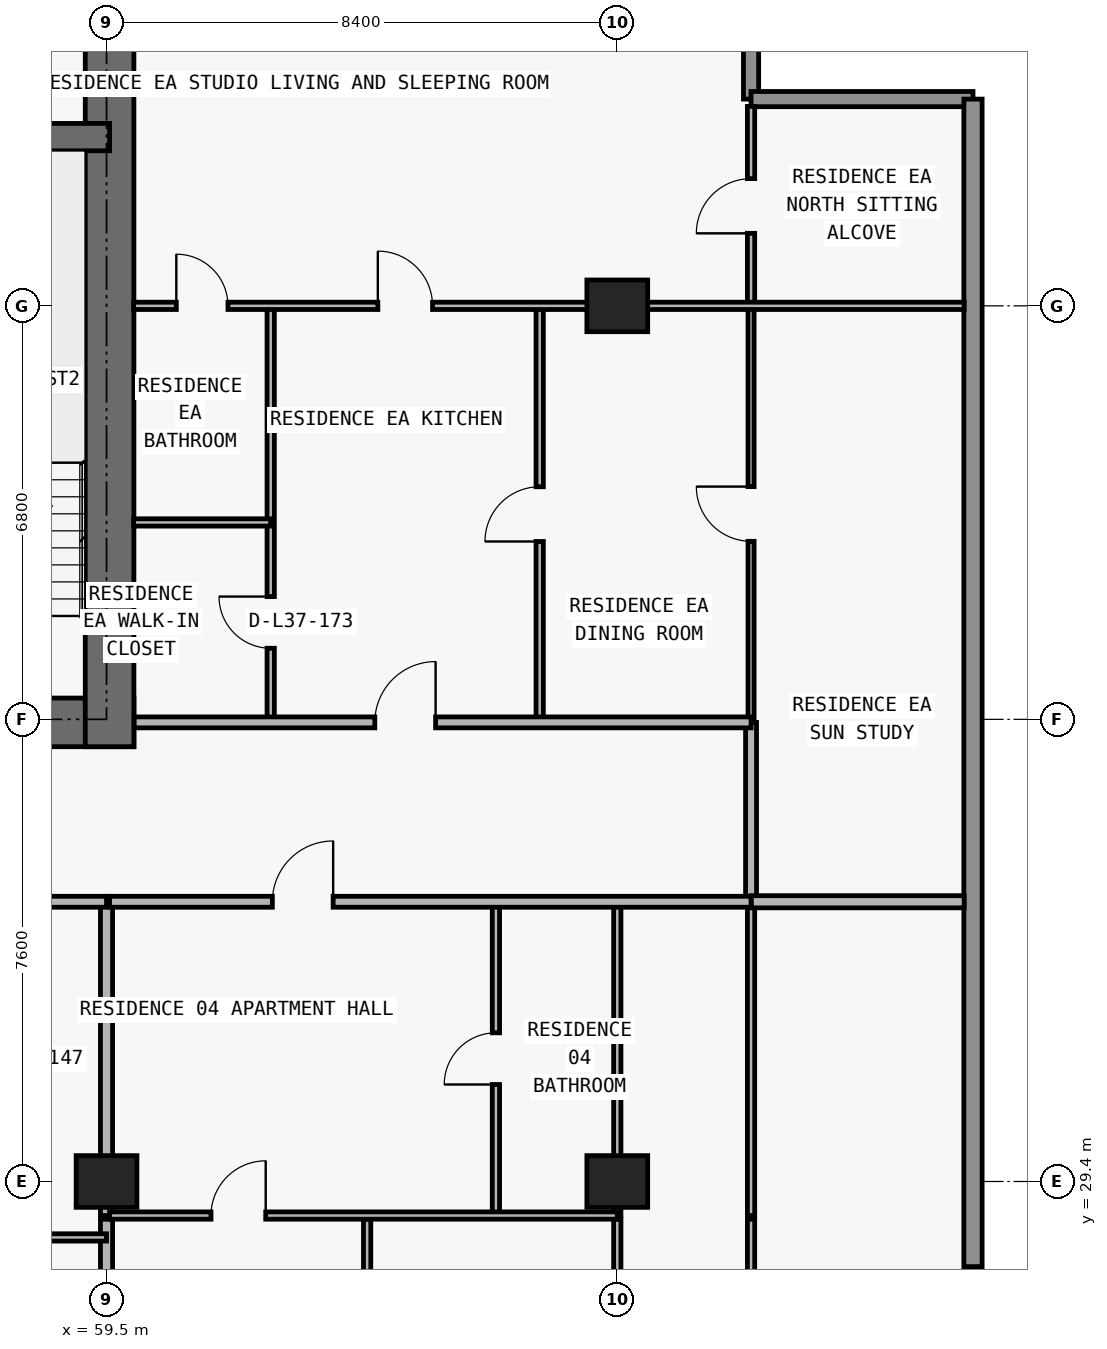
"""IFC4 building model, lengths in metres.
Left out: names, types, materials, properties, quantities, classifications, styles, units other than length and angle.
Written with IfcOpenShell. Run it as: python <this file> out.ifc"""

import sys

from ifc_helpers import new_model, si_unit, direction, frame, frame_2d, origin, origin_2d, place, context, subcontext, project, spatial, rectangle, extrude, element, fill, save


model = new_model("IFC4")
c1 = context("Model", 3, precision=1e-05, world=origin(), true_north=direction((0.0, 1.0)))
c2 = subcontext(c1, "Body", "Model", "MODEL_VIEW")
j1 = project(units=[si_unit("LENGTHUNIT", "METRE"), si_unit("PLANEANGLEUNIT", "RADIAN")], contexts=[c1])
p1 = place(None, origin())
s1 = spatial("IfcSite", under=j1, at=p1, CompositionType="ELEMENT")
p2 = place(p1, origin())
s2 = spatial("IfcBuilding", under=s1, at=p2, CompositionType="ELEMENT")
p3 = place(p2, frame((0.0, 0.0, 135.6)))
s3 = spatial("IfcBuildingStorey", under=s2, at=p3, CompositionType="ELEMENT", Elevation=135.6)
for number, where, z_axis, x_axis in (
    (1, (59.5, 29.4, 0.0), (0.0, 0.0, 1.0), (1.0, 0.0, 0.0)),
    (2, (67.9, 29.4, 0.0), (0.0, 0.0, 1.0), (1.0, 0.0, 0.0)),
    (3, (67.9, 43.8, 0.0), (0.0, 0.0, 1.0), (1.0, 0.0, 0.0)),
):
    element("IfcColumn", number, at=place(p3, frame(where, z_axis=z_axis, x_axis=x_axis)), inside=s3, PredefinedType="COLUMN", context=c2, shape_type="SweptSolid", body=[
        extrude(rectangle(XDim=1.0, YDim=0.85, at=origin_2d()), origin(), (0.0, 0.0, 1.0), 3.05),
    ])
p4 = place(p3, frame((17.85, 36.95, 0.0), z_axis=(0.0, 0.0, 1.0), x_axis=(1.0, 0.0, 0.0)))
e4 = element("IfcWall", 4, at=p4, inside=s3, PredefinedType="SHEAR", context=c2, shape_type="SweptSolid", body=[
    extrude(rectangle(XDim=42.1, YDim=0.8, at=frame_2d((21.05, 0.0))), origin(), (0.0, 0.0, 1.0), 3.05),
])
p5 = place(p4, frame((14.45, 0.0, 0.0)))
e5 = element("IfcOpeningElement", 5, at=p5, cuts=e4, PredefinedType="OPENING", context=c2, shape_type="SweptSolid", body=[
    extrude(rectangle(XDim=1.1, YDim=2.15, at=frame_2d((0.55, 1.075))), frame((0.0, 0.41, 0.0), z_axis=(0.0, -1.0, 0.0), x_axis=(1.0, 0.0, 0.0)), (0.0, 0.0, 1.0), 0.82),
])
p6 = place(p4, frame((6.3, 0.0, 0.0)))
e6 = element("IfcOpeningElement", 6, at=p6, cuts=e4, PredefinedType="OPENING", context=c2, shape_type="SweptSolid", body=[
    extrude(rectangle(XDim=1.05, YDim=2.15, at=frame_2d((0.525, 1.075))), frame((0.0, 0.41, 0.0), z_axis=(0.0, -1.0, 0.0), x_axis=(1.0, 0.0, 0.0)), (0.0, 0.0, 1.0), 0.82),
])
p7 = place(p4, frame((34.8, 0.0, 0.0)))
e7 = element("IfcOpeningElement", 7, at=p7, cuts=e4, PredefinedType="OPENING", context=c2, shape_type="SweptSolid", body=[
    extrude(rectangle(XDim=1.05, YDim=2.15, at=frame_2d((0.525, 1.075))), frame((0.0, 0.41, 0.0), z_axis=(0.0, -1.0, 0.0), x_axis=(1.0, 0.0, 0.0)), (0.0, 0.0, 1.0), 0.82),
])
p8 = place(p4, frame((10.913, 0.0, 0.0)))
e8 = element("IfcOpeningElement", 8, at=p8, cuts=e4, PredefinedType="OPENING", context=c2, shape_type="SweptSolid", body=[
    extrude(rectangle(XDim=1.05, YDim=2.15, at=frame_2d((0.525, 1.075))), frame((0.0, 0.41, 0.0), z_axis=(0.0, -1.0, 0.0), x_axis=(1.0, 0.0, 0.0)), (0.0, 0.0, 1.0), 0.82),
])
p9 = place(p4, frame((24.15, 0.0, 0.0)))
e9 = element("IfcOpeningElement", 9, at=p9, cuts=e4, PredefinedType="OPENING", context=c2, shape_type="SweptSolid", body=[
    extrude(rectangle(XDim=1.05, YDim=2.15, at=frame_2d((0.525, 1.075))), frame((0.0, 0.41, 0.0), z_axis=(0.0, -1.0, 0.0), x_axis=(1.0, 0.0, 0.0)), (0.0, 0.0, 1.0), 0.82),
])
p10 = place(p3, frame((59.55, 36.55, 0.0), z_axis=(0.0, 0.0, 1.0), x_axis=(0.0, 1.0, 0.0)))
e10 = element("IfcWall", 10, at=p10, inside=s3, PredefinedType="SHEAR", context=c2, shape_type="SweptSolid", body=[
    extrude(rectangle(XDim=14.05, YDim=0.8, at=frame_2d((7.025, 0.0))), origin(), (0.0, 0.0, 1.0), 3.05),
])
p11 = place(p3, frame((18.25, 46.575, 0.0), z_axis=(0.0, 0.0, 1.0), x_axis=(1.0, 0.0, 0.0)))
e11 = element("IfcWall", 11, at=p11, inside=s3, PredefinedType="SHEAR", context=c2, shape_type="SweptSolid", body=[
    extrude(rectangle(XDim=41.3, YDim=0.45, at=frame_2d((20.65, 0.0))), origin(), (0.0, 0.0, 1.0), 3.05),
])
p12 = place(p11, frame((7.625, 0.0, 0.0)))
e12 = element("IfcOpeningElement", 12, at=p12, cuts=e11, PredefinedType="OPENING", context=c2, shape_type="SweptSolid", body=[
    extrude(rectangle(XDim=1.05, YDim=2.15, at=frame_2d((0.525, 1.075))), frame((0.0, 0.235, 0.0), z_axis=(0.0, -1.0, 0.0), x_axis=(1.0, 0.0, 0.0)), (0.0, 0.0, 1.0), 0.47),
])
p13 = place(p11, frame((32.675, 0.0, 0.0)))
e13 = element("IfcOpeningElement", 13, at=p13, cuts=e11, PredefinedType="OPENING", context=c2, shape_type="SweptSolid", body=[
    extrude(rectangle(XDim=1.05, YDim=2.15, at=frame_2d((0.525, 1.075))), frame((0.0, 0.235, 0.0), z_axis=(0.0, -1.0, 0.0), x_axis=(1.0, 0.0, 0.0)), (0.0, 0.0, 1.0), 0.47),
])
p14 = place(p3, frame((70.1, 50.45, 0.0), z_axis=(0.0, 0.0, 1.0), x_axis=(0.0, -1.0, 0.0)))
e14 = element("IfcWall", 14, at=p14, inside=s3, PredefinedType="ELEMENTEDWALL", context=c2, shape_type="SweptSolid", body=[
    extrude(rectangle(XDim=3.25, YDim=0.25, at=frame_2d((1.625, 0.0))), origin(), (0.0, 0.0, 1.0), 3.05),
])
p15 = place(p3, frame((70.1, 47.2, 0.0), z_axis=(0.0, 0.0, 1.0), x_axis=(1.0, 0.0, 0.0)))
e15 = element("IfcWall", 15, at=p15, inside=s3, PredefinedType="ELEMENTEDWALL", context=c2, shape_type="SweptSolid", body=[
    extrude(rectangle(XDim=3.65, YDim=0.25, at=frame_2d((1.825, 0.0))), origin(), (0.0, 0.0, 1.0), 3.05),
])
p16 = place(p3, frame((73.75, 47.2, 0.0), z_axis=(0.0, 0.0, 1.0), x_axis=(0.0, -1.0, 0.0)))
e16 = element("IfcWall", 16, at=p16, inside=s3, PredefinedType="STANDARD", context=c2, shape_type="SweptSolid", body=[
    extrude(rectangle(XDim=19.2, YDim=0.3, at=frame_2d((9.6, 0.0))), origin(), (0.0, 0.0, 1.0), 3.05),
])
p17 = place(p3, frame((59.5, 8.84, 0.0), z_axis=(0.0, 0.0, 1.0), x_axis=(0.0, 1.0, 0.0)))
e17 = element("IfcWall", 17, at=p17, inside=s3, PredefinedType="PARTITIONING", context=c2, shape_type="SweptSolid", body=[
    extrude(rectangle(XDim=19.94, YDim=0.2, at=frame_2d((9.97, 0.0))), origin(), (0.0, 0.0, 1.0), 2.174),
])
p18 = place(p3, frame((59.5, 28.84, 0.0), z_axis=(0.0, 0.0, 1.0), x_axis=(0.0, 1.0, 0.0)))
e18 = element("IfcWall", 18, at=p18, inside=s3, PredefinedType="PARTITIONING", context=c2, shape_type="SweptSolid", body=[
    extrude(rectangle(XDim=5.16, YDim=0.2, at=frame_2d((2.58, 0.0))), origin(), (0.0, 0.0, 1.0), 2.174),
])
p19 = place(p3, frame((62.2, 36.95, 0.0), z_axis=(0.0, 0.0, 1.0), x_axis=(0.0, 1.0, 0.0)))
e19 = element("IfcWall", 19, at=p19, inside=s3, PredefinedType="PARTITIONING", context=c2, shape_type="SweptSolid", body=[
    extrude(rectangle(XDim=6.85, YDim=0.12, at=frame_2d((3.425, 0.0))), origin(), (0.0, 0.0, 1.0), 3.05),
])
p20 = place(p19, frame((1.219, 0.0, 0.0)))
e20 = element("IfcOpeningElement", 20, at=p20, cuts=e19, PredefinedType="OPENING", context=c2, shape_type="SweptSolid", body=[
    extrude(rectangle(XDim=0.85, YDim=2.1, at=frame_2d((0.425, 1.05))), frame((0.0, 0.07, 0.0), z_axis=(0.0, -1.0, 0.0), x_axis=(1.0, 0.0, 0.0)), (0.0, 0.0, 1.0), 0.14),
])
p21 = place(p3, frame((63.786, 23.69, 0.0), z_axis=(0.0, 0.0, 1.0), x_axis=(0.0, 1.0, 0.0)))
e21 = element("IfcWall", 21, at=p21, inside=s3, PredefinedType="PARTITIONING", context=c2, shape_type="SweptSolid", body=[
    extrude(rectangle(XDim=5.09, YDim=0.12, at=frame_2d((2.545, 0.0))), origin(), (0.0, 0.0, 1.0), 2.486),
])
p22 = place(p21, frame((2.095, 0.0, 0.0)))
e22 = element("IfcOpeningElement", 22, at=p22, cuts=e21, PredefinedType="OPENING", context=c2, shape_type="SweptSolid", body=[
    extrude(rectangle(XDim=0.9, YDim=2.15, at=frame_2d((0.45, 1.075))), frame((0.0, 0.07, 0.0), z_axis=(0.0, -1.0, 0.0), x_axis=(1.0, 0.0, 0.0)), (0.0, 0.0, 1.0), 0.14),
])
p23 = place(p3, frame((65.904, 28.84, 0.0), z_axis=(0.0, 0.0, 1.0), x_axis=(0.0, 1.0, 0.0)))
e23 = element("IfcWall", 23, at=p23, inside=s3, PredefinedType="PARTITIONING", context=c2, shape_type="SweptSolid", body=[
    extrude(rectangle(XDim=5.16, YDim=0.12, at=frame_2d((2.58, 0.0))), origin(), (0.0, 0.0, 1.0), 2.679),
])
p24 = place(p23, frame((2.155, 0.0, 0.0)))
e24 = element("IfcOpeningElement", 24, at=p24, cuts=e23, PredefinedType="OPENING", context=c2, shape_type="SweptSolid", body=[
    extrude(rectangle(XDim=0.85, YDim=2.1, at=frame_2d((0.425, 1.05))), frame((0.0, 0.07, 0.0), z_axis=(0.0, -1.0, 0.0), x_axis=(1.0, 0.0, 0.0)), (0.0, 0.0, 1.0), 0.14),
])
p25 = place(p3, frame((66.624, 36.95, 0.0), z_axis=(0.0, 0.0, 1.0), x_axis=(0.0, 1.0, 0.0)))
e25 = element("IfcWall", 25, at=p25, inside=s3, PredefinedType="PARTITIONING", context=c2, shape_type="SweptSolid", body=[
    extrude(rectangle(XDim=6.85, YDim=0.12, at=frame_2d((3.425, 0.0))), origin(), (0.0, 0.0, 1.0), 3.05),
])
p26 = place(p25, frame((2.975, 0.0, 0.0)))
e26 = element("IfcOpeningElement", 26, at=p26, cuts=e25, PredefinedType="OPENING", context=c2, shape_type="SweptSolid", body=[
    extrude(rectangle(XDim=0.9, YDim=2.15, at=frame_2d((0.45, 1.075))), frame((0.0, 0.07, 0.0), z_axis=(0.0, -1.0, 0.0), x_axis=(1.0, 0.0, 0.0)), (0.0, 0.0, 1.0), 0.14),
])
p27 = place(p3, frame((67.9, 8.84, 0.0), z_axis=(0.0, 0.0, 1.0), x_axis=(0.0, 1.0, 0.0)))
e27 = element("IfcWall", 27, at=p27, inside=s3, PredefinedType="PARTITIONING", context=c2, shape_type="SweptSolid", body=[
    extrude(rectangle(XDim=19.94, YDim=0.12, at=frame_2d((9.97, 0.0))), origin(), (0.0, 0.0, 1.0), 2.174),
])
p28 = place(p27, frame((16.945, 0.0, 0.0)))
e28 = element("IfcOpeningElement", 28, at=p28, cuts=e27, PredefinedType="OPENING", context=c2, shape_type="SweptSolid", body=[
    extrude(rectangle(XDim=0.9, YDim=2.124, at=frame_2d((0.45, 1.062))), frame((0.0, 0.07, 0.0), z_axis=(0.0, -1.0, 0.0), x_axis=(1.0, 0.0, 0.0)), (0.0, 0.0, 1.0), 0.14),
])
p29 = place(p3, frame((67.9, 28.84, 0.0), z_axis=(0.0, 0.0, 1.0), x_axis=(0.0, 1.0, 0.0)))
e29 = element("IfcWall", 29, at=p29, inside=s3, PredefinedType="PARTITIONING", context=c2, shape_type="SweptSolid", body=[
    extrude(rectangle(XDim=5.16, YDim=0.12, at=frame_2d((2.58, 0.0))), origin(), (0.0, 0.0, 1.0), 2.174),
])
p30 = place(p3, frame((70.1, 8.92, 0.0), z_axis=(0.0, 0.0, 1.0), x_axis=(0.0, 1.0, 0.0)))
e30 = element("IfcWall", 30, at=p30, inside=s3, PredefinedType="PARTITIONING", context=c2, shape_type="SweptSolid", body=[
    extrude(rectangle(XDim=19.86, YDim=0.12, at=frame_2d((9.93, 0.0))), origin(), (0.0, 0.0, 1.0), 3.05),
])
p31 = place(p30, frame((9.48, 0.0, 0.0)))
e31 = element("IfcOpeningElement", 31, at=p31, cuts=e30, PredefinedType="OPENING", context=c2, shape_type="SweptSolid", body=[
    extrude(rectangle(XDim=0.9, YDim=2.15, at=frame_2d((0.45, 1.075))), frame((0.0, 0.07, 0.0), z_axis=(0.0, -1.0, 0.0), x_axis=(1.0, 0.0, 0.0)), (0.0, 0.0, 1.0), 0.14),
])
p32 = place(p3, frame((70.1, 28.84, 0.0), z_axis=(0.0, 0.0, 1.0), x_axis=(0.0, 1.0, 0.0)))
e32 = element("IfcWall", 32, at=p32, inside=s3, PredefinedType="PARTITIONING", context=c2, shape_type="SweptSolid", body=[
    extrude(rectangle(XDim=5.16, YDim=0.12, at=frame_2d((2.58, 0.0))), origin(), (0.0, 0.0, 1.0), 3.05),
])
p33 = place(p3, frame((70.1, 34.005, 0.0), z_axis=(0.0, 0.0, 1.0), x_axis=(0.0, 1.0, 0.0)))
e33 = element("IfcWall", 33, at=p33, inside=s3, PredefinedType="PARTITIONING", context=c2, shape_type="SweptSolid", body=[
    extrude(rectangle(XDim=2.945, YDim=0.18, at=frame_2d((1.473, 0.0))), origin(), (0.0, 0.0, 1.0), 3.05),
])
p34 = place(p3, frame((70.1, 36.955, 0.0), z_axis=(0.0, 0.0, 1.0), x_axis=(0.0, 1.0, 0.0)))
e34 = element("IfcWall", 34, at=p34, inside=s3, PredefinedType="MOVABLE", context=c2, shape_type="SweptSolid", body=[
    extrude(rectangle(XDim=6.845, YDim=0.1, at=frame_2d((3.422, 0.0))), origin(), (0.0, 0.0, 1.0), 3.05),
])
p35 = place(p34, frame((2.972, 0.0, 0.0)))
e35 = element("IfcOpeningElement", 35, at=p35, cuts=e34, PredefinedType="OPENING", context=c2, shape_type="SweptSolid", body=[
    extrude(rectangle(XDim=0.9, YDim=2.15, at=frame_2d((0.45, 1.075))), frame((0.0, 0.06, 0.0), z_axis=(0.0, -1.0, 0.0), x_axis=(1.0, 0.0, 0.0)), (0.0, 0.0, 1.0), 0.12),
])
p36 = place(p3, frame((70.1, 43.805, 0.0), z_axis=(0.0, 0.0, 1.0), x_axis=(0.0, 1.0, 0.0)))
e36 = element("IfcWall", 36, at=p36, inside=s3, PredefinedType="PARTITIONING", context=c2, shape_type="SweptSolid", body=[
    extrude(rectangle(XDim=3.275, YDim=0.12, at=frame_2d((1.638, 0.0))), origin(), (0.0, 0.0, 1.0), 3.05),
])
p37 = place(p36, frame((1.188, 0.0, 0.0)))
e37 = element("IfcOpeningElement", 37, at=p37, cuts=e36, PredefinedType="OPENING", context=c2, shape_type="SweptSolid", body=[
    extrude(rectangle(XDim=0.9, YDim=2.15, at=frame_2d((0.45, 1.075))), frame((0.0, 0.07, 0.0), z_axis=(0.0, -1.0, 0.0), x_axis=(1.0, 0.0, 0.0)), (0.0, 0.0, 1.0), 0.14),
])
p38 = place(p3, frame((55.9, 28.48, 0.0), z_axis=(0.0, 0.0, 1.0), x_axis=(1.0, 0.0, 0.0)))
e38 = element("IfcWall", 38, at=p38, inside=s3, PredefinedType="PARTITIONING", context=c2, shape_type="SweptSolid", body=[
    extrude(rectangle(XDim=3.6, YDim=0.12, at=frame_2d((1.8, 0.0))), origin(), (0.0, 0.0, 1.0), 3.05),
])
p39 = place(p3, frame((59.55, 28.84, 0.0), z_axis=(0.0, 0.0, 1.0), x_axis=(1.0, 0.0, 0.0)))
e39 = element("IfcWall", 39, at=p39, inside=s3, PredefinedType="PARTITIONING", context=c2, shape_type="SweptSolid", body=[
    extrude(rectangle(XDim=8.35, YDim=0.12, at=frame_2d((4.175, 0.0))), origin(), (0.0, 0.0, 1.0), 3.05),
])
p40 = place(p39, frame((1.668, 0.0, 0.0)))
e40 = element("IfcOpeningElement", 40, at=p40, cuts=e39, PredefinedType="OPENING", context=c2, shape_type="SweptSolid", body=[
    extrude(rectangle(XDim=0.9, YDim=2.15, at=frame_2d((0.45, 1.075))), frame((0.0, 0.07, 0.0), z_axis=(0.0, -1.0, 0.0), x_axis=(1.0, 0.0, 0.0)), (0.0, 0.0, 1.0), 0.14),
])
p41 = place(p3, frame((55.9, 34.0, 0.0), z_axis=(0.0, 0.0, 1.0), x_axis=(1.0, 0.0, 0.0)))
e41 = element("IfcWall", 41, at=p41, inside=s3, PredefinedType="PARTITIONING", context=c2, shape_type="SweptSolid", body=[
    extrude(rectangle(XDim=3.6, YDim=0.18, at=frame_2d((1.8, 0.0))), origin(), (0.0, 0.0, 1.0), 3.05),
])
p42 = place(p3, frame((59.55, 34.0, 0.0), z_axis=(0.0, 0.0, 1.0), x_axis=(1.0, 0.0, 0.0)))
e42 = element("IfcWall", 42, at=p42, inside=s3, PredefinedType="PARTITIONING", context=c2, shape_type="SweptSolid", body=[
    extrude(rectangle(XDim=10.55, YDim=0.18, at=frame_2d((5.275, 0.0))), origin(), (0.0, 0.0, 1.0), 3.05),
])
p43 = place(p42, frame((2.677, 0.0, 0.0)))
e43 = element("IfcOpeningElement", 43, at=p43, cuts=e42, PredefinedType="OPENING", context=c2, shape_type="SweptSolid", body=[
    extrude(rectangle(XDim=1.0, YDim=2.2, at=frame_2d((0.5, 1.1))), frame((0.0, 0.1, 0.0), z_axis=(0.0, -1.0, 0.0), x_axis=(1.0, 0.0, 0.0)), (0.0, 0.0, 1.0), 0.2),
])
p44 = place(p3, frame((70.105, 34.0, 0.0), z_axis=(0.0, 0.0, 1.0), x_axis=(1.0, 0.0, 0.0)))
e44 = element("IfcWall", 44, at=p44, inside=s3, PredefinedType="PARTITIONING", context=c2, shape_type="SweptSolid", body=[
    extrude(rectangle(XDim=3.5, YDim=0.2, at=frame_2d((1.75, 0.0))), origin(), (0.0, 0.0, 1.0), 3.05),
])
p45 = place(p3, frame((59.955, 36.95, 0.0), z_axis=(0.0, 0.0, 1.0), x_axis=(1.0, 0.0, 0.0)))
e45 = element("IfcWall", 45, at=p45, inside=s3, PredefinedType="PARTITIONING", context=c2, shape_type="SweptSolid", body=[
    extrude(rectangle(XDim=10.145, YDim=0.18, at=frame_2d((5.073, 0.0))), origin(), (0.0, 0.0, 1.0), 3.05),
])
p46 = place(p45, frame((3.957, 0.0, 0.0)))
e46 = element("IfcOpeningElement", 46, at=p46, cuts=e45, PredefinedType="OPENING", context=c2, shape_type="SweptSolid", body=[
    extrude(rectangle(XDim=1.0, YDim=2.2, at=frame_2d((0.5, 1.1))), frame((0.0, 0.1, 0.0), z_axis=(0.0, -1.0, 0.0), x_axis=(1.0, 0.0, 0.0)), (0.0, 0.0, 1.0), 0.2),
])
p47 = place(p3, frame((59.945, 40.238, 0.0), z_axis=(0.0, 0.0, 1.0), x_axis=(1.0, 0.0, 0.0)))
e47 = element("IfcWall", 47, at=p47, inside=s3, PredefinedType="PARTITIONING", context=c2, shape_type="SweptSolid", body=[
    extrude(rectangle(XDim=2.255, YDim=0.12, at=frame_2d((1.127, 0.0))), origin(), (0.0, 0.0, 1.0), 3.05),
])
p48 = place(p3, frame((59.945, 43.8, 0.0), z_axis=(0.0, 0.0, 1.0), x_axis=(1.0, 0.0, 0.0)))
e48 = element("IfcWall", 48, at=p48, inside=s3, PredefinedType="PARTITIONING", context=c2, shape_type="SweptSolid", body=[
    extrude(rectangle(XDim=13.66, YDim=0.12, at=frame_2d((6.83, 0.0))), origin(), (0.0, 0.0, 1.0), 2.339),
])
p49 = place(p48, frame((4.017, 0.0, 0.0)))
e49 = element("IfcOpeningElement", 49, at=p49, cuts=e48, PredefinedType="OPENING", context=c2, shape_type="SweptSolid", body=[
    extrude(rectangle(XDim=0.9, YDim=2.15, at=frame_2d((0.45, 1.075))), frame((0.0, 0.07, 0.0), z_axis=(0.0, -1.0, 0.0), x_axis=(1.0, 0.0, 0.0)), (0.0, 0.0, 1.0), 0.14),
])
p50 = place(p48, frame((0.702, 0.0, 0.0)))
e50 = element("IfcOpeningElement", 50, at=p50, cuts=e48, PredefinedType="OPENING", context=c2, shape_type="SweptSolid", body=[
    extrude(rectangle(XDim=0.85, YDim=2.1, at=frame_2d((0.425, 1.05))), frame((0.0, 0.07, 0.0), z_axis=(0.0, -1.0, 0.0), x_axis=(1.0, 0.0, 0.0)), (0.0, 0.0, 1.0), 0.14),
])
p51 = place(p43, origin())
e51 = element("IfcDoor", 51, at=p51, inside=s3, OperationType="SINGLE_SWING_RIGHT", PredefinedType="DOOR", context=c2, shape_type="SweptSolid", body=[
    extrude(rectangle(XDim=1.0, YDim=2.2, at=frame_2d((0.5, 1.1))), frame((0.0, 0.025, 0.0), z_axis=(0.0, -1.0, 0.0), x_axis=(1.0, 0.0, 0.0)), (0.0, 0.0, 1.0), 0.05),
])
fill(e43, e51)
p52 = place(p24, origin())
e52 = element("IfcDoor", 52, at=p52, inside=s3, OperationType="SINGLE_SWING_LEFT", PredefinedType="DOOR", context=c2, shape_type="SweptSolid", body=[
    extrude(rectangle(XDim=0.85, YDim=2.1, at=frame_2d((0.425, 1.05))), frame((0.0, 0.025, 0.0), z_axis=(0.0, -1.0, 0.0), x_axis=(1.0, 0.0, 0.0)), (0.0, 0.0, 1.0), 0.05),
])
fill(e24, e52)
p53 = place(p40, origin())
e53 = element("IfcDoor", 53, at=p53, inside=s3, OperationType="SINGLE_SWING_RIGHT", PredefinedType="DOOR", context=c2, shape_type="SweptSolid", body=[
    extrude(rectangle(XDim=0.9, YDim=2.15, at=frame_2d((0.45, 1.075))), frame((0.0, 0.025, 0.0), z_axis=(0.0, -1.0, 0.0), x_axis=(1.0, 0.0, 0.0)), (0.0, 0.0, 1.0), 0.05),
])
fill(e40, e53)
p54 = place(p26, origin())
e54 = element("IfcDoor", 54, at=p54, inside=s3, OperationType="SINGLE_SWING_LEFT", PredefinedType="DOOR", context=c2, shape_type="SweptSolid", body=[
    extrude(rectangle(XDim=0.9, YDim=2.15, at=frame_2d((0.45, 1.075))), frame((0.0, 0.025, 0.0), z_axis=(0.0, -1.0, 0.0), x_axis=(1.0, 0.0, 0.0)), (0.0, 0.0, 1.0), 0.05),
])
fill(e26, e54)
p55 = place(p46, origin())
e55 = element("IfcDoor", 55, at=p55, inside=s3, OperationType="SINGLE_SWING_RIGHT", PredefinedType="DOOR", context=c2, shape_type="SweptSolid", body=[
    extrude(rectangle(XDim=1.0, YDim=2.2, at=frame_2d((0.5, 1.1))), frame((0.0, 0.025, 0.0), z_axis=(0.0, -1.0, 0.0), x_axis=(1.0, 0.0, 0.0)), (0.0, 0.0, 1.0), 0.05),
])
fill(e46, e55)
p56 = place(p49, origin())
e56 = element("IfcDoor", 56, at=p56, inside=s3, OperationType="SINGLE_SWING_LEFT", PredefinedType="DOOR", context=c2, shape_type="SweptSolid", body=[
    extrude(rectangle(XDim=0.9, YDim=2.15, at=frame_2d((0.45, 1.075))), frame((0.0, 0.025, 0.0), z_axis=(0.0, -1.0, 0.0), x_axis=(1.0, 0.0, 0.0)), (0.0, 0.0, 1.0), 0.05),
])
fill(e49, e56)
p57 = place(p20, origin())
e57 = element("IfcDoor", 57, at=p57, inside=s3, OperationType="SINGLE_SWING_RIGHT", PredefinedType="DOOR", context=c2, shape_type="SweptSolid", body=[
    extrude(rectangle(XDim=0.85, YDim=2.1, at=frame_2d((0.425, 1.05))), frame((0.0, 0.025, 0.0), z_axis=(0.0, -1.0, 0.0), x_axis=(1.0, 0.0, 0.0)), (0.0, 0.0, 1.0), 0.05),
])
fill(e20, e57)
p58 = place(p50, origin())
e58 = element("IfcDoor", 58, at=p58, inside=s3, OperationType="SINGLE_SWING_LEFT", PredefinedType="DOOR", context=c2, shape_type="SweptSolid", body=[
    extrude(rectangle(XDim=0.85, YDim=2.1, at=frame_2d((0.425, 1.05))), frame((0.0, 0.025, 0.0), z_axis=(0.0, -1.0, 0.0), x_axis=(1.0, 0.0, 0.0)), (0.0, 0.0, 1.0), 0.05),
])
fill(e50, e58)
p59 = place(p35, origin())
e59 = element("IfcDoor", 59, at=p59, inside=s3, OperationType="SINGLE_SWING_RIGHT", PredefinedType="DOOR", context=c2, shape_type="SweptSolid", body=[
    extrude(rectangle(XDim=0.9, YDim=2.15, at=frame_2d((0.45, 1.075))), frame((0.0, 0.025, 0.0), z_axis=(0.0, -1.0, 0.0), x_axis=(1.0, 0.0, 0.0)), (0.0, 0.0, 1.0), 0.05),
])
fill(e35, e59)
p60 = place(p37, origin())
e60 = element("IfcDoor", 60, at=p60, inside=s3, OperationType="SINGLE_SWING_LEFT", PredefinedType="DOOR", context=c2, shape_type="SweptSolid", body=[
    extrude(rectangle(XDim=0.9, YDim=2.15, at=frame_2d((0.45, 1.075))), frame((0.0, 0.025, 0.0), z_axis=(0.0, -1.0, 0.0), x_axis=(1.0, 0.0, 0.0)), (0.0, 0.0, 1.0), 0.05),
])
fill(e37, e60)
save(model, sys.argv[1])
